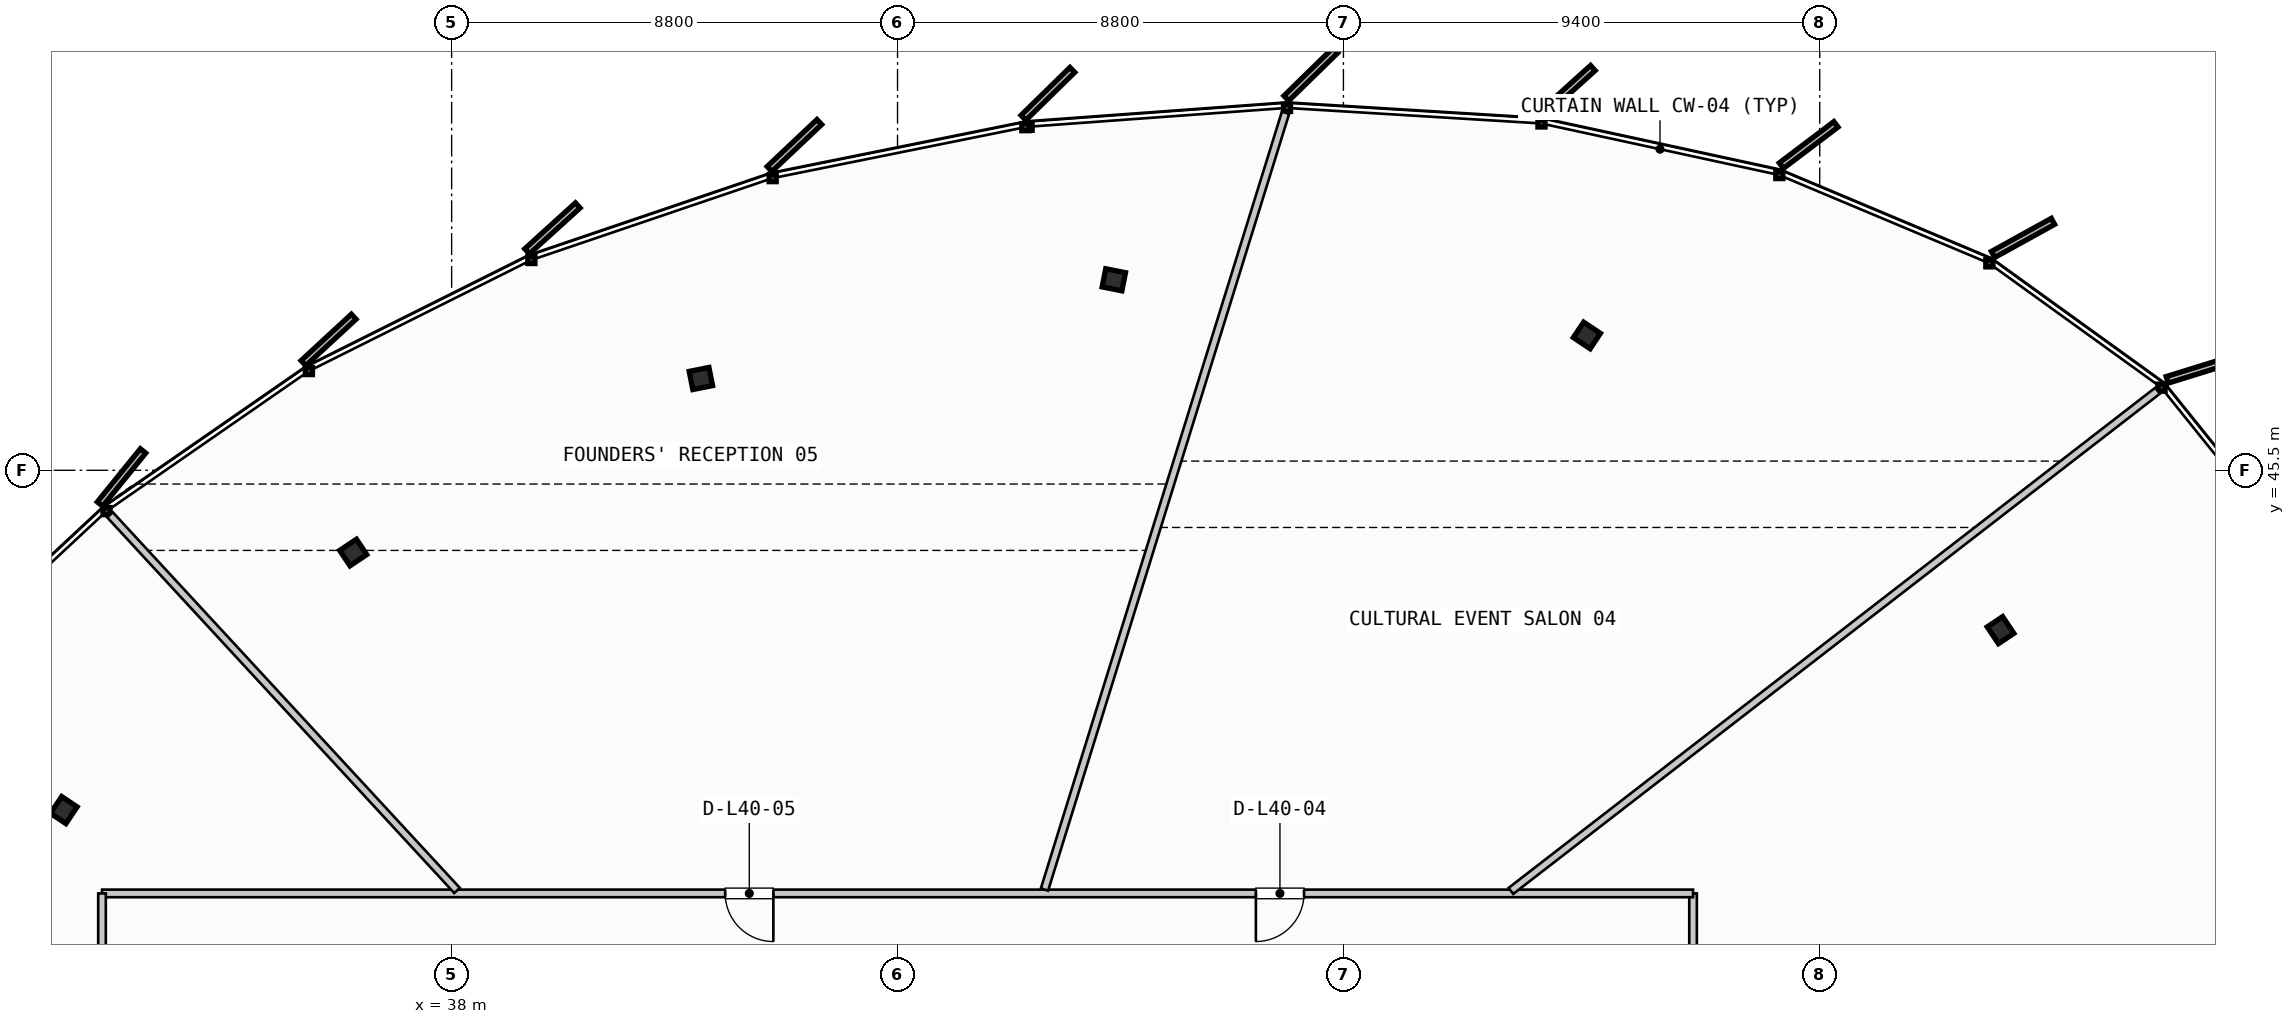
"""IFC4 building model, lengths in metres.
Left out: names, types, materials, properties, quantities, classifications, styles, units other than length and angle.
Written with IfcOpenShell. Run it as: python <this file> out.ifc"""

import sys

from ifc_helpers import new_model, si_unit, direction, frame, frame_2d, origin, origin_2d, place, context, subcontext, project, spatial, rectangle, i_section, extrude, source, transform, mapped, element, fill, save


model = new_model("IFC4")
c1 = context("Model", 3, precision=1e-05, world=origin(), true_north=direction((0.0, 1.0)))
c2 = subcontext(c1, "Body", "Model", "MODEL_VIEW")
j1 = project(units=[si_unit("LENGTHUNIT", "METRE"), si_unit("PLANEANGLEUNIT", "RADIAN")], contexts=[c1])
p1 = place(None, origin())
s1 = spatial("IfcSite", under=j1, at=p1, CompositionType="ELEMENT")
p2 = place(p1, origin())
s2 = spatial("IfcBuilding", under=s1, at=p2, CompositionType="ELEMENT")
p3 = place(p2, frame((0.0, 0.0, 157.2)))
s3 = spatial("IfcBuildingStorey", under=s2, at=p3, CompositionType="ELEMENT", Elevation=157.2)
m1 = source(origin(), c2, "Body", "SweptSolid", [
    extrude(i_section(OverallWidth=0.397, OverallDepth=0.365, WebThickness=0.028, FlangeThickness=0.044, FilletRadius=0.015, at=origin_2d()), origin(), (0.0, 0.0, 1.0), 3.3),
])
for number, where, z_axis, x_axis in (
    (1, (68.569, 42.345, 0.0), (0.0, 0.0, 1.0), (0.831, 0.556, 0.0)),
    (2, (60.405, 48.161, 0.0), (0.0, 0.0, 1.0), (0.556, 0.831, 0.0)),
    (3, (51.069, 49.259, 0.0), (0.0, 0.0, 1.0), (0.195, 0.981, 0.0)),
    (4, (42.919, 47.311, 0.0), (0.0, 0.0, 1.0), (-0.195, 0.981, 0.0)),
    (5, (36.058, 43.877, 0.0), (0.0, 0.0, 1.0), (-0.556, 0.831, 0.0)),
    (6, (30.346, 38.794, 0.0), (0.0, 0.0, 1.0), (-0.831, 0.556, 0.0)),
):
    element("IfcColumn", number, at=place(p3, frame(where, z_axis=z_axis, x_axis=x_axis)), inside=s3, PredefinedType="COLUMN", context=c2, shape_type="MappedRepresentation", body=[
        mapped(m1, transform((0.0, 0.0, 0.0), scale=1.0)),
    ])
p4 = place(p3, frame((62.5, 35.45, 0.0), z_axis=(0.0, 0.0, 1.0), x_axis=(0.0, 1.0, 0.0)))
e7 = element("IfcWall", 7, at=p4, inside=s3, PredefinedType="PARTITIONING", context=c2, shape_type="SweptSolid", body=[
    extrude(rectangle(XDim=1.7, YDim=0.15, at=frame_2d((0.85, 0.0))), origin(), (0.0, 0.0, 1.0), 2.28),
])
p5 = place(p3, frame((62.5, 37.15, 0.0), z_axis=(0.0, 0.0, 1.0), x_axis=(-1.0, 0.0, 0.0)))
e8 = element("IfcWall", 8, at=p5, inside=s3, PredefinedType="PARTITIONING", context=c2, shape_type="SweptSolid", body=[
    extrude(rectangle(XDim=31.4, YDim=0.15, at=frame_2d((15.7, 0.0))), origin(), (0.0, 0.0, 1.0), 2.28),
])
p6 = place(p5, frame((7.678, 0.0, 0.0)))
e9 = element("IfcOpeningElement", 9, at=p6, cuts=e8, PredefinedType="OPENING", context=c2, shape_type="SweptSolid", body=[
    extrude(rectangle(XDim=0.95, YDim=2.15, at=frame_2d((0.475, 1.075))), frame((0.0, 0.085, 0.0), z_axis=(0.0, -1.0, 0.0), x_axis=(1.0, 0.0, 0.0)), (0.0, 0.0, 1.0), 0.17),
])
p7 = place(p5, frame((18.151, 0.0, 0.0)))
e10 = element("IfcOpeningElement", 10, at=p7, cuts=e8, PredefinedType="OPENING", context=c2, shape_type="SweptSolid", body=[
    extrude(rectangle(XDim=0.95, YDim=2.15, at=frame_2d((0.475, 1.075))), frame((0.0, 0.085, 0.0), z_axis=(0.0, -1.0, 0.0), x_axis=(1.0, 0.0, 0.0)), (0.0, 0.0, 1.0), 0.17),
])
p8 = place(p3, frame((31.1, 37.15, 0.0), z_axis=(0.0, 0.0, 1.0), x_axis=(0.0, -1.0, 0.0)))
e11 = element("IfcWall", 11, at=p8, inside=s3, PredefinedType="PARTITIONING", context=c2, shape_type="SweptSolid", body=[
    extrude(rectangle(XDim=1.7, YDim=0.15, at=frame_2d((0.85, 0.0))), origin(), (0.0, 0.0, 1.0), 2.28),
])
p9 = place(p3, frame((58.905, 37.199, 0.0), z_axis=(0.0, 0.0, 1.0), x_axis=(0.791018028547, 0.611792839541, 0.0)))
e12 = element("IfcWall", 12, at=p9, inside=s3, PredefinedType="PARTITIONING", context=c2, shape_type="SweptSolid", body=[
    extrude(rectangle(XDim=16.134, YDim=0.15, at=frame_2d((8.067, 0.0))), origin(), (0.0, 0.0, 1.0), 2.28),
])
p10 = place(p3, frame((49.7, 37.226, 0.0), z_axis=(0.0, 0.0, 1.0), x_axis=(0.296377685756, 0.955070817995, 0.0)))
e13 = element("IfcWall", 13, at=p10, inside=s3, PredefinedType="PARTITIONING", context=c2, shape_type="SweptSolid", body=[
    extrude(rectangle(XDim=16.051, YDim=0.15, at=frame_2d((8.025, 0.0))), origin(), (0.0, 0.0, 1.0), 2.28),
])
p11 = place(p3, frame((38.106, 37.209, 0.0), z_axis=(0.0, 0.0, 1.0), x_axis=(-0.678612616673, 0.734496369285, 0.0)))
e14 = element("IfcWall", 14, at=p11, inside=s3, PredefinedType="PARTITIONING", context=c2, shape_type="SweptSolid", body=[
    extrude(rectangle(XDim=10.092, YDim=0.15, at=frame_2d((5.046, 0.0))), origin(), (0.0, 0.0, 1.0), 2.28),
])
m2 = source(origin(), c2, "Body", "SweptSolid", [
    extrude(rectangle(XDim=0.95, YDim=2.15, at=frame_2d((0.475, 1.075))), frame((0.0, 0.025, 0.0), z_axis=(0.0, -1.0, 0.0), x_axis=(1.0, 0.0, 0.0)), (0.0, 0.0, 1.0), 0.05),
])
p12 = place(p6, origin())
e15 = element("IfcDoor", 15, at=p12, inside=s3, OperationType="SINGLE_SWING_RIGHT", PredefinedType="DOOR", context=c2, shape_type="MappedRepresentation", body=[
    mapped(m2, transform((0.0, 0.0, 0.0), scale=1.0)),
])
fill(e9, e15)
p13 = place(p7, origin())
e16 = element("IfcDoor", 16, at=p13, inside=s3, OperationType="SINGLE_SWING_LEFT", PredefinedType="DOOR", context=c2, shape_type="MappedRepresentation", body=[
    mapped(m2, transform((0.0, 0.0, 0.0), scale=1.0)),
])
fill(e10, e16)
save(model, sys.argv[1])
